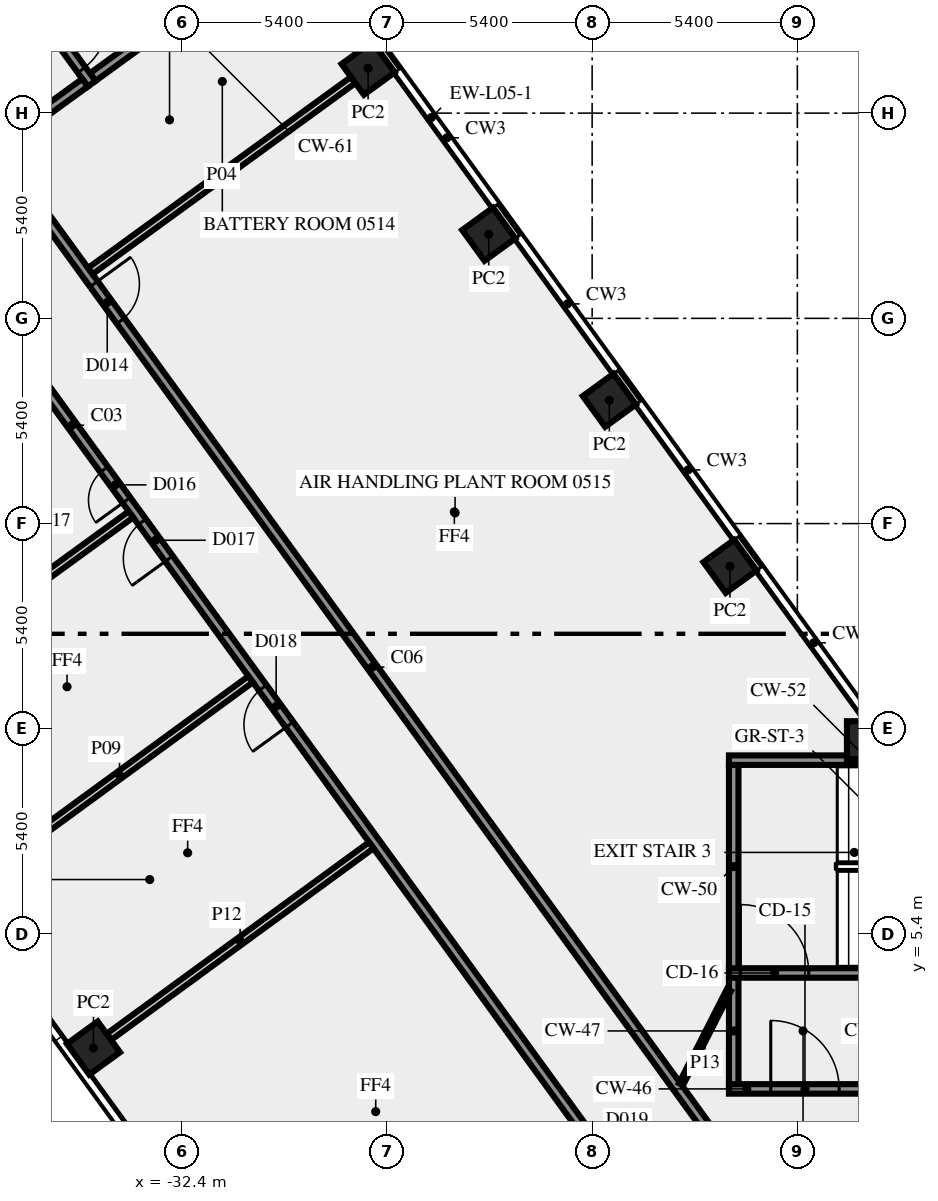
"""IFC4 building model, lengths in metres.
Left out: names, types, materials, properties, quantities, classifications, styles, units other than length and angle.
Written with IfcOpenShell. Run it as: python <this file> out.ifc"""

import sys

from ifc_helpers import new_model, si_unit, direction, frame, frame_2d, origin, origin_2d, place, context, subcontext, project, spatial, rectangle, extrude, element, fill, save


model = new_model("IFC4")
c1 = context("Model", 3, precision=1e-05, world=origin(), true_north=direction((0.0, 1.0)))
c2 = subcontext(c1, "Body", "Model", "MODEL_VIEW")
j1 = project(units=[si_unit("LENGTHUNIT", "METRE"), si_unit("PLANEANGLEUNIT", "RADIAN")], contexts=[c1])
p1 = place(None, origin())
s1 = spatial("IfcSite", under=j1, at=p1, CompositionType="ELEMENT")
p2 = place(p1, origin())
s2 = spatial("IfcBuilding", under=s1, at=p2, CompositionType="ELEMENT")
p3 = place(p2, frame((0.0, 0.0, 25.0)))
s3 = spatial("IfcBuildingStorey", under=s2, at=p3, CompositionType="ELEMENT", Elevation=25.0)
for number, where, z_axis, x_axis in (
    (1, (-17.974, 15.075, 0.0), (0.0, 0.0, 1.0), (-0.588, 0.809, 0.0)),
    (2, (-21.147, 19.444, 0.0), (0.0, 0.0, 1.0), (-0.588, 0.809, 0.0)),
    (3, (-24.321, 23.812, 0.0), (0.0, 0.0, 1.0), (-0.588, 0.809, 0.0)),
    (4, (-27.495, 28.181, 0.0), (0.0, 0.0, 1.0), (-0.588, 0.809, 0.0)),
    (5, (-34.722, 2.4, 0.0), (0.0, 0.0, 1.0), (0.588, -0.809, 0.0)),
    (6, (-14.395, 10.5, 0.0), (0.0, 0.0, 1.0), (-1.0, 0.0, 0.0)),
):
    element("IfcColumn", number, at=place(p3, frame(where, z_axis=z_axis, x_axis=x_axis)), inside=s3, PredefinedType="COLUMN", context=c2, shape_type="SweptSolid", body=[
        extrude(rectangle(XDim=1.0, YDim=1.0, at=origin_2d()), origin(), (0.0, 0.0, 1.0), 5.65),
    ])
p4 = place(p3, frame((-14.354, 11.093, 0.0), z_axis=(0.0, 0.0, 1.0), x_axis=(-0.587787194805, 0.809015583054, 0.0)))
e7 = element("IfcWall", 7, at=p4, inside=s3, PredefinedType="SOLIDWALL", context=c2, shape_type="SweptSolid", body=[
    extrude(rectangle(XDim=39.044, YDim=0.2, at=frame_2d((19.522, 0.0))), origin(), (0.0, 0.0, 1.0), 5.65),
])
p5 = place(p3, frame((-55.244, 29.646, 0.0), z_axis=(0.0, 0.0, 1.0), x_axis=(0.587784449244, -0.809017577823, 0.0)))
e8 = element("IfcWall", 8, at=p5, inside=s3, PredefinedType="SOLIDWALL", context=c2, shape_type="SweptSolid", body=[
    extrude(rectangle(XDim=44.654, YDim=0.2, at=frame_2d((22.327, 0.0))), origin(), (0.0, 0.0, 1.0), 5.65),
])
p6 = place(p3, frame((-18.0, 1.325, 0.0), z_axis=(0.0, 0.0, 1.0), x_axis=(1.0, 0.0, 0.0)))
e9 = element("IfcWall", 9, at=p6, inside=s3, PredefinedType="SHEAR", context=c2, shape_type="SweptSolid", body=[
    extrude(rectangle(XDim=3.9, YDim=0.25, at=frame_2d((1.95, 0.0))), origin(), (0.0, 0.0, 1.0), 5.65),
])
p7 = place(p6, frame((1.1, 0.0, 0.0)))
e10 = element("IfcOpeningElement", 10, at=p7, cuts=e9, PredefinedType="OPENING", context=c2, shape_type="SweptSolid", body=[
    extrude(rectangle(XDim=1.8, YDim=2.1, at=frame_2d((0.9, 1.05))), frame((0.0, 0.135, 0.0), z_axis=(0.0, -1.0, 0.0), x_axis=(1.0, 0.0, 0.0)), (0.0, 0.0, 1.0), 0.27),
])
p8 = place(p3, frame((-17.875, 1.45, 0.0), z_axis=(0.0, 0.0, 1.0), x_axis=(0.0, 1.0, 0.0)))
e11 = element("IfcWall", 11, at=p8, inside=s3, PredefinedType="SHEAR", context=c2, shape_type="SweptSolid", body=[
    extrude(rectangle(XDim=2.8, YDim=0.25, at=frame_2d((1.4, 0.0))), origin(), (0.0, 0.0, 1.0), 5.65),
])
p9 = place(p3, frame((-18.0, 4.375, 0.0), z_axis=(0.0, 0.0, 1.0), x_axis=(1.0, 0.0, 0.0)))
e12 = element("IfcWall", 12, at=p9, inside=s3, PredefinedType="SHEAR", context=c2, shape_type="SweptSolid", body=[
    extrude(rectangle(XDim=10.5, YDim=0.25, at=frame_2d((5.25, 0.0))), origin(), (0.0, 0.0, 1.0), 5.65),
])
p10 = place(p9, frame((0.3, 0.0, 0.0)))
e13 = element("IfcOpeningElement", 13, at=p10, cuts=e12, PredefinedType="OPENING", context=c2, shape_type="SweptSolid", body=[
    extrude(rectangle(XDim=1.8, YDim=2.1, at=frame_2d((0.9, 1.05))), frame((0.0, 0.135, 0.0), z_axis=(0.0, -1.0, 0.0), x_axis=(1.0, 0.0, 0.0)), (0.0, 0.0, 1.0), 0.27),
])
p11 = place(p3, frame((-17.875, 4.5, 0.0), z_axis=(0.0, 0.0, 1.0), x_axis=(0.0, 1.0, 0.0)))
e14 = element("IfcWall", 14, at=p11, inside=s3, PredefinedType="SHEAR", context=c2, shape_type="SweptSolid", body=[
    extrude(rectangle(XDim=5.35, YDim=0.25, at=frame_2d((2.675, 0.0))), origin(), (0.0, 0.0, 1.0), 5.65),
])
p12 = place(p3, frame((-18.0, 9.975, 0.0), z_axis=(0.0, 0.0, 1.0), x_axis=(1.0, 0.0, 0.0)))
e15 = element("IfcWall", 15, at=p12, inside=s3, PredefinedType="SHEAR", context=c2, shape_type="SweptSolid", body=[
    extrude(rectangle(XDim=10.5, YDim=0.25, at=frame_2d((5.25, 0.0))), origin(), (0.0, 0.0, 1.0), 5.65),
])
p13 = place(p12, frame((4.5, 0.0, 1.0)))
e16 = element("IfcOpeningElement", 16, at=p13, cuts=e15, PredefinedType="OPENING", context=c2, shape_type="SweptSolid", body=[
    extrude(rectangle(XDim=1.2, YDim=1.2, at=frame_2d((0.6, 0.6))), frame((0.0, 0.135, 0.0), z_axis=(0.0, -1.0, 0.0), x_axis=(1.0, 0.0, 0.0)), (0.0, 0.0, 1.0), 0.27),
])
p14 = place(p3, frame((-30.414, 31.092, 0.0), z_axis=(0.0, 0.0, 1.0), x_axis=(-0.8089984606, -0.587810760999, 0.0)))
e17 = element("IfcWall", 17, at=p14, inside=s3, PredefinedType="SHEAR", context=c2, shape_type="SweptSolid", body=[
    extrude(rectangle(XDim=5.35, YDim=0.25, at=frame_2d((2.675, 0.0))), origin(), (0.0, 0.0, 1.0), 5.65),
])
p15 = place(p3, frame((-40.942, 36.267, 0.0), z_axis=(0.0, 0.0, 1.0), x_axis=(0.587795589702, -0.809009483706, 0.0)))
e18 = element("IfcWall", 18, at=p15, inside=s3, PredefinedType="SHEAR", context=c2, shape_type="SweptSolid", body=[
    extrude(rectangle(XDim=10.5, YDim=0.25, at=frame_2d((5.25, 0.0))), origin(), (0.0, 0.0, 1.0), 5.65),
])
p16 = place(p15, frame((8.25, 0.0, 0.0)))
e19 = element("IfcOpeningElement", 19, at=p16, cuts=e18, PredefinedType="OPENING", context=c2, shape_type="SweptSolid", body=[
    extrude(rectangle(XDim=1.8, YDim=2.1, at=frame_2d((0.9, 1.05))), frame((0.0, 0.135, 0.0), z_axis=(0.0, -1.0, 0.0), x_axis=(1.0, 0.0, 0.0)), (0.0, 0.0, 1.0), 0.27),
])
p17 = place(p3, frame((-34.945, 27.8, 0.0), z_axis=(0.0, 0.0, 1.0), x_axis=(-0.809041377956, -0.587751689708, 0.0)))
e20 = element("IfcWall", 20, at=p17, inside=s3, PredefinedType="SHEAR", context=c2, shape_type="SweptSolid", body=[
    extrude(rectangle(XDim=2.8, YDim=0.25, at=frame_2d((1.4, 0.0))), origin(), (0.0, 0.0, 1.0), 5.65),
])
p18 = place(p3, frame((-20.531, -1.523, 0.0), z_axis=(0.0, 0.0, 1.0), x_axis=(-0.587785385475, 0.809016897612, 0.0)))
e21 = element("IfcWall", 21, at=p18, inside=s3, PredefinedType="SOLIDWALL", context=c2, shape_type="SweptSolid", body=[
    extrude(rectangle(XDim=50.212, YDim=0.25, at=frame_2d((25.106, 0.0))), origin(), (0.0, 0.0, 1.0), 5.65),
])
p19 = place(p18, frame((47.87, 0.0, 0.0)))
e22 = element("IfcOpeningElement", 22, at=p19, cuts=e21, PredefinedType="OPENING", context=c2, shape_type="SweptSolid", body=[
    extrude(rectangle(XDim=1.2, YDim=2.1, at=frame_2d((0.6, 1.05))), frame((0.0, 0.135, 0.0), z_axis=(0.0, -1.0, 0.0), x_axis=(1.0, 0.0, 0.0)), (0.0, 0.0, 1.0), 0.27),
])
p20 = place(p18, frame((20.765, 0.0, 0.0)))
e23 = element("IfcOpeningElement", 23, at=p20, cuts=e21, PredefinedType="OPENING", context=c2, shape_type="SweptSolid", body=[
    extrude(rectangle(XDim=1.2, YDim=2.1, at=frame_2d((0.6, 1.05))), frame((0.0, 0.135, 0.0), z_axis=(0.0, -1.0, 0.0), x_axis=(1.0, 0.0, 0.0)), (0.0, 0.0, 1.0), 0.27),
])
p21 = place(p18, frame((15.366, 0.0, 0.0)))
e24 = element("IfcOpeningElement", 24, at=p21, cuts=e21, PredefinedType="OPENING", context=c2, shape_type="SweptSolid", body=[
    extrude(rectangle(XDim=1.2, YDim=2.1, at=frame_2d((0.6, 1.05))), frame((0.0, 0.135, 0.0), z_axis=(0.0, -1.0, 0.0), x_axis=(1.0, 0.0, 0.0)), (0.0, 0.0, 1.0), 0.27),
])
p22 = place(p18, frame((22.667, 0.0, 0.0)))
e25 = element("IfcOpeningElement", 25, at=p22, cuts=e21, PredefinedType="OPENING", context=c2, shape_type="SweptSolid", body=[
    extrude(rectangle(XDim=1.0, YDim=2.1, at=frame_2d((0.5, 1.05))), frame((0.0, 0.135, 0.0), z_axis=(0.0, -1.0, 0.0), x_axis=(1.0, 0.0, 0.0)), (0.0, 0.0, 1.0), 0.27),
])
p23 = place(p18, frame((0.533, 0.0, 0.0)))
e26 = element("IfcOpeningElement", 26, at=p23, cuts=e21, PredefinedType="OPENING", context=c2, shape_type="SweptSolid", body=[
    extrude(rectangle(XDim=1.0, YDim=2.1, at=frame_2d((0.5, 1.05))), frame((0.0, 0.135, 0.0), z_axis=(0.0, -1.0, 0.0), x_axis=(1.0, 0.0, 0.0)), (0.0, 0.0, 1.0), 0.27),
])
p24 = place(p3, frame((-37.232, 25.972, 0.0), z_axis=(0.0, 0.0, 1.0), x_axis=(0.587786323093, -0.809016216391, 0.0)))
e27 = element("IfcWall", 27, at=p24, inside=s3, PredefinedType="SOLIDWALL", context=c2, shape_type="SweptSolid", body=[
    extrude(rectangle(XDim=33.493, YDim=0.25, at=frame_2d((16.747, 0.0))), origin(), (0.0, 0.0, 1.0), 5.65),
])
p25 = place(p24, frame((4.285, 0.0, 0.0)))
e28 = element("IfcOpeningElement", 28, at=p25, cuts=e27, PredefinedType="OPENING", context=c2, shape_type="SweptSolid", body=[
    extrude(rectangle(XDim=1.2, YDim=2.1, at=frame_2d((0.6, 1.05))), frame((0.0, 0.135, 0.0), z_axis=(0.0, -1.0, 0.0), x_axis=(1.0, 0.0, 0.0)), (0.0, 0.0, 1.0), 0.27),
])
p26 = place(p24, frame((0.34, 0.0, 0.0)))
e29 = element("IfcOpeningElement", 29, at=p26, cuts=e27, PredefinedType="OPENING", context=c2, shape_type="SweptSolid", body=[
    extrude(rectangle(XDim=0.9, YDim=2.1, at=frame_2d((0.45, 1.05))), frame((0.0, 0.135, 0.0), z_axis=(0.0, -1.0, 0.0), x_axis=(1.0, 0.0, 0.0)), (0.0, 0.0, 1.0), 0.27),
])
p27 = place(p3, frame((-27.892, 27.868, 0.0), z_axis=(0.0, 0.0, 1.0), x_axis=(-0.809008992571, -0.587796265673, 0.0)))
e30 = element("IfcWall", 30, at=p27, inside=s3, PredefinedType="SOLIDWALL", context=c2, shape_type="SweptSolid", body=[
    extrude(rectangle(XDim=8.547, YDim=0.2, at=frame_2d((4.273, 0.0))), origin(), (0.0, 0.0, 1.0), 5.65),
])
p28 = place(p3, frame((-37.487, 7.064, 0.0), z_axis=(0.0, 0.0, 1.0), x_axis=(0.807513605299, 0.589848944441, 0.0)))
e31 = element("IfcWall", 31, at=p28, inside=s3, PredefinedType="SOLIDWALL", context=c2, shape_type="SweptSolid", body=[
    extrude(rectangle(XDim=8.545, YDim=0.2, at=frame_2d((4.272, 0.0))), origin(), (0.0, 0.0, 1.0), 5.65),
])
p29 = place(p3, frame((-33.737, 16.441, 0.0), z_axis=(0.0, 0.0, 1.0), x_axis=(-0.808967063133, -0.587853970614, 0.0)))
e32 = element("IfcWall", 32, at=p29, inside=s3, PredefinedType="SOLIDWALL", context=c2, shape_type="SweptSolid", body=[
    extrude(rectangle(XDim=8.545, YDim=0.2, at=frame_2d((4.272, 0.0))), origin(), (0.0, 0.0, 1.0), 5.65),
])
p30 = place(p3, frame((-34.313, 2.696, 0.0), z_axis=(0.0, 0.0, 1.0), x_axis=(0.80756437274, 0.589779436639, 0.0)))
e33 = element("IfcWall", 33, at=p30, inside=s3, PredefinedType="SOLIDWALL", context=c2, shape_type="SweptSolid", body=[
    extrude(rectangle(XDim=8.544, YDim=0.2, at=frame_2d((4.272, 0.0))), origin(), (0.0, 0.0, 1.0), 5.65),
])
p31 = place(p3, frame((-19.261, 1.45, 0.0), z_axis=(0.0, 0.0, 1.0), x_axis=(0.453950796792, 0.891026752736, 0.0)))
e34 = element("IfcWall", 34, at=p31, inside=s3, PredefinedType="PARTITIONING", context=c2, shape_type="SweptSolid", body=[
    extrude(rectangle(XDim=2.778, YDim=0.12, at=frame_2d((1.389, 0.0))), origin(), (0.0, 0.0, 1.0), 5.65),
])
p32 = place(p7, origin())
e35 = element("IfcDoor", 35, at=p32, inside=s3, OperationType="DOUBLE_DOOR_SINGLE_SWING", PredefinedType="DOOR", context=c2, shape_type="SweptSolid", body=[
    extrude(rectangle(XDim=1.8, YDim=2.1, at=frame_2d((0.9, 1.05))), frame((0.0, 0.025, 0.0), z_axis=(0.0, -1.0, 0.0), x_axis=(1.0, 0.0, 0.0)), (0.0, 0.0, 1.0), 0.05),
])
fill(e10, e35)
p33 = place(p10, origin())
e36 = element("IfcDoor", 36, at=p33, inside=s3, OperationType="DOUBLE_DOOR_SINGLE_SWING", PredefinedType="DOOR", context=c2, shape_type="SweptSolid", body=[
    extrude(rectangle(XDim=1.8, YDim=2.1, at=frame_2d((0.9, 1.05))), frame((0.0, 0.025, 0.0), z_axis=(0.0, -1.0, 0.0), x_axis=(1.0, 0.0, 0.0)), (0.0, 0.0, 1.0), 0.05),
])
fill(e13, e36)
p34 = place(p16, origin())
e37 = element("IfcDoor", 37, at=p34, inside=s3, OperationType="DOUBLE_DOOR_SINGLE_SWING", PredefinedType="DOOR", context=c2, shape_type="SweptSolid", body=[
    extrude(rectangle(XDim=1.8, YDim=2.1, at=frame_2d((0.9, 1.05))), frame((0.0, 0.025, 0.0), z_axis=(0.0, -1.0, 0.0), x_axis=(1.0, 0.0, 0.0)), (0.0, 0.0, 1.0), 0.05),
])
fill(e19, e37)
p35 = place(p25, origin())
e38 = element("IfcDoor", 38, at=p35, inside=s3, OperationType="SINGLE_SWING_LEFT", PredefinedType="DOOR", context=c2, shape_type="SweptSolid", body=[
    extrude(rectangle(XDim=1.2, YDim=2.1, at=frame_2d((0.6, 1.05))), frame((0.0, 0.025, 0.0), z_axis=(0.0, -1.0, 0.0), x_axis=(1.0, 0.0, 0.0)), (0.0, 0.0, 1.0), 0.05),
])
fill(e28, e38)
p36 = place(p20, origin())
e39 = element("IfcDoor", 39, at=p36, inside=s3, OperationType="SINGLE_SWING_RIGHT", PredefinedType="DOOR", context=c2, shape_type="SweptSolid", body=[
    extrude(rectangle(XDim=1.2, YDim=2.1, at=frame_2d((0.6, 1.05))), frame((0.0, 0.025, 0.0), z_axis=(0.0, -1.0, 0.0), x_axis=(1.0, 0.0, 0.0)), (0.0, 0.0, 1.0), 0.05),
])
fill(e23, e39)
p37 = place(p21, origin())
e40 = element("IfcDoor", 40, at=p37, inside=s3, OperationType="SINGLE_SWING_RIGHT", PredefinedType="DOOR", context=c2, shape_type="SweptSolid", body=[
    extrude(rectangle(XDim=1.2, YDim=2.1, at=frame_2d((0.6, 1.05))), frame((0.0, 0.025, 0.0), z_axis=(0.0, -1.0, 0.0), x_axis=(1.0, 0.0, 0.0)), (0.0, 0.0, 1.0), 0.05),
])
fill(e24, e40)
p38 = place(p22, origin())
e41 = element("IfcDoor", 41, at=p38, inside=s3, OperationType="SINGLE_SWING_LEFT", PredefinedType="DOOR", context=c2, shape_type="SweptSolid", body=[
    extrude(rectangle(XDim=1.0, YDim=2.1, at=frame_2d((0.5, 1.05))), frame((0.0, 0.025, 0.0), z_axis=(0.0, -1.0, 0.0), x_axis=(1.0, 0.0, 0.0)), (0.0, 0.0, 1.0), 0.05),
])
fill(e25, e41)
save(model, sys.argv[1])
